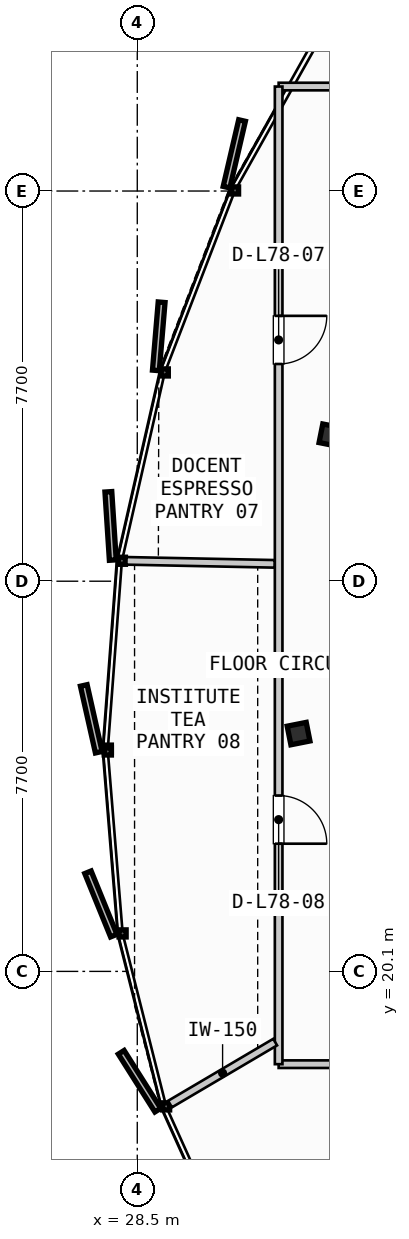
"""IFC4 building model, lengths in metres.
Left out: names, types, materials, properties, quantities, classifications, styles, units other than length and angle.
Written with IfcOpenShell. Run it as: python <this file> out.ifc"""

import sys

from ifc_helpers import new_model, si_unit, direction, frame, frame_2d, origin, origin_2d, place, context, subcontext, project, spatial, rectangle, i_section, extrude, source, transform, mapped, element, fill, save


model = new_model("IFC4")
c1 = context("Model", 3, precision=1e-05, world=origin(), true_north=direction((0.0, 1.0)))
c2 = subcontext(c1, "Body", "Model", "MODEL_VIEW")
j1 = project(units=[si_unit("LENGTHUNIT", "METRE"), si_unit("PLANEANGLEUNIT", "RADIAN")], contexts=[c1])
p1 = place(None, origin())
s1 = spatial("IfcSite", under=j1, at=p1, CompositionType="ELEMENT")
p2 = place(p1, origin())
s2 = spatial("IfcBuilding", under=s1, at=p2, CompositionType="ELEMENT")
p3 = place(p2, frame((0.0, 0.0, 293.95)))
s3 = spatial("IfcBuildingStorey", under=s2, at=p3, CompositionType="ELEMENT", Elevation=293.95)
m1 = source(origin(), c2, "Body", "SweptSolid", [
    extrude(i_section(OverallWidth=0.374, OverallDepth=0.383, WebThickness=0.017, FlangeThickness=0.026, FilletRadius=0.015, at=origin_2d()), origin(), (0.0, 0.0, 1.0), 3.21),
])
for number, where, z_axis, x_axis in (
    (1, (32.312, 30.682, 0.0), (0.0, 0.0, 1.0), (-0.981, 0.195, 0.0)),
    (2, (31.683, 24.793, 0.0), (0.0, 0.0, 1.0), (-0.981, -0.195, 0.0)),
):
    element("IfcColumn", number, at=place(p3, frame(where, z_axis=z_axis, x_axis=x_axis)), inside=s3, PredefinedType="COLUMN", context=c2, shape_type="MappedRepresentation", body=[
        mapped(m1, transform((0.0, 0.0, 0.0), scale=1.0)),
    ])
p4 = place(p3, frame((31.29, 18.269, 0.0), z_axis=(0.0, 0.0, 1.0), x_axis=(1.0, 0.0, 0.0)))
e3 = element("IfcWall", 3, at=p4, inside=s3, PredefinedType="PARTITIONING", context=c2, shape_type="SweptSolid", body=[
    extrude(rectangle(XDim=30.274, YDim=0.15, at=frame_2d((15.137, 0.0))), origin(), (0.0, 0.0, 1.0), 2.315),
])
p5 = place(p4, frame((6.115, 0.0, 0.0)))
e4 = element("IfcOpeningElement", 4, at=p5, cuts=e3, PredefinedType="OPENING", context=c2, shape_type="SweptSolid", body=[
    extrude(rectangle(XDim=0.95, YDim=2.15, at=frame_2d((0.475, 1.075))), frame((0.0, 0.085, 0.0), z_axis=(0.0, -1.0, 0.0), x_axis=(1.0, 0.0, 0.0)), (0.0, 0.0, 1.0), 0.17),
])
p6 = place(p4, frame((19.973, 0.0, 0.0)))
e5 = element("IfcOpeningElement", 5, at=p6, cuts=e3, PredefinedType="OPENING", context=c2, shape_type="SweptSolid", body=[
    extrude(rectangle(XDim=0.95, YDim=2.15, at=frame_2d((0.475, 1.075))), frame((0.0, 0.085, 0.0), z_axis=(0.0, -1.0, 0.0), x_axis=(1.0, 0.0, 0.0)), (0.0, 0.0, 1.0), 0.17),
])
p7 = place(p3, frame((61.564, 37.562, 0.0), z_axis=(0.0, 0.0, 1.0), x_axis=(-1.0, 0.0, 0.0)))
e6 = element("IfcWall", 6, at=p7, inside=s3, PredefinedType="PARTITIONING", context=c2, shape_type="SweptSolid", body=[
    extrude(rectangle(XDim=30.274, YDim=0.15, at=frame_2d((15.137, 0.0))), origin(), (0.0, 0.0, 1.0), 2.315),
])
p8 = place(p7, frame((7.545, 0.0, 0.0)))
e7 = element("IfcOpeningElement", 7, at=p8, cuts=e6, PredefinedType="OPENING", context=c2, shape_type="SweptSolid", body=[
    extrude(rectangle(XDim=0.95, YDim=2.15, at=frame_2d((0.475, 1.075))), frame((0.0, 0.085, 0.0), z_axis=(0.0, -1.0, 0.0), x_axis=(1.0, 0.0, 0.0)), (0.0, 0.0, 1.0), 0.17),
])
p9 = place(p7, frame((20.04, 0.0, 0.0)))
e8 = element("IfcOpeningElement", 8, at=p9, cuts=e6, PredefinedType="OPENING", context=c2, shape_type="SweptSolid", body=[
    extrude(rectangle(XDim=0.95, YDim=2.15, at=frame_2d((0.475, 1.075))), frame((0.0, 0.085, 0.0), z_axis=(0.0, -1.0, 0.0), x_axis=(1.0, 0.0, 0.0)), (0.0, 0.0, 1.0), 0.17),
])
p10 = place(p3, frame((31.29, 37.562, 0.0), z_axis=(0.0, 0.0, 1.0), x_axis=(0.0, -1.0, 0.0)))
e9 = element("IfcWall", 9, at=p10, inside=s3, PredefinedType="PARTITIONING", context=c2, shape_type="SweptSolid", body=[
    extrude(rectangle(XDim=19.293, YDim=0.15, at=frame_2d((9.646, 0.0))), origin(), (0.0, 0.0, 1.0), 2.315),
])
p11 = place(p10, frame((4.525, 0.0, 0.0)))
e10 = element("IfcOpeningElement", 10, at=p11, cuts=e9, PredefinedType="OPENING", context=c2, shape_type="SweptSolid", body=[
    extrude(rectangle(XDim=0.95, YDim=2.15, at=frame_2d((0.475, 1.075))), frame((0.0, 0.085, 0.0), z_axis=(0.0, -1.0, 0.0), x_axis=(1.0, 0.0, 0.0)), (0.0, 0.0, 1.0), 0.17),
])
p12 = place(p10, frame((13.992, 0.0, 0.0)))
e11 = element("IfcOpeningElement", 11, at=p12, cuts=e9, PredefinedType="OPENING", context=c2, shape_type="SweptSolid", body=[
    extrude(rectangle(XDim=0.95, YDim=2.15, at=frame_2d((0.475, 1.075))), frame((0.0, 0.085, 0.0), z_axis=(0.0, -1.0, 0.0), x_axis=(1.0, 0.0, 0.0)), (0.0, 0.0, 1.0), 0.17),
])
p13 = place(p3, frame((31.221, 18.704, 0.0), z_axis=(0.0, 0.0, 1.0), x_axis=(-0.861571718846, -0.507635866823, 0.0)))
e12 = element("IfcWall", 12, at=p13, inside=s3, PredefinedType="PARTITIONING", context=c2, shape_type="SweptSolid", body=[
    extrude(rectangle(XDim=2.408, YDim=0.15, at=frame_2d((1.204, 0.0))), origin(), (0.0, 0.0, 1.0), 2.315),
])
p14 = place(p3, frame((31.21, 28.143, 0.0), z_axis=(0.0, 0.0, 1.0), x_axis=(-0.99979414097, 0.020289792572, 0.0)))
e13 = element("IfcWall", 13, at=p14, inside=s3, PredefinedType="PARTITIONING", context=c2, shape_type="SweptSolid", body=[
    extrude(rectangle(XDim=2.924, YDim=0.15, at=frame_2d((1.462, 0.0))), origin(), (0.0, 0.0, 1.0), 2.315),
])
m2 = source(origin(), c2, "Body", "SweptSolid", [
    extrude(rectangle(XDim=0.95, YDim=2.15, at=frame_2d((0.475, 1.075))), frame((0.0, 0.025, 0.0), z_axis=(0.0, -1.0, 0.0), x_axis=(1.0, 0.0, 0.0)), (0.0, 0.0, 1.0), 0.05),
])
p15 = place(p11, origin())
e14 = element("IfcDoor", 14, at=p15, inside=s3, OperationType="SINGLE_SWING_LEFT", PredefinedType="DOOR", context=c2, shape_type="MappedRepresentation", body=[
    mapped(m2, transform((0.0, 0.0, 0.0), scale=1.0)),
])
fill(e10, e14)
p16 = place(p12, origin())
e15 = element("IfcDoor", 15, at=p16, inside=s3, OperationType="SINGLE_SWING_RIGHT", PredefinedType="DOOR", context=c2, shape_type="MappedRepresentation", body=[
    mapped(m2, transform((0.0, 0.0, 0.0), scale=1.0)),
])
fill(e11, e15)
save(model, sys.argv[1])
